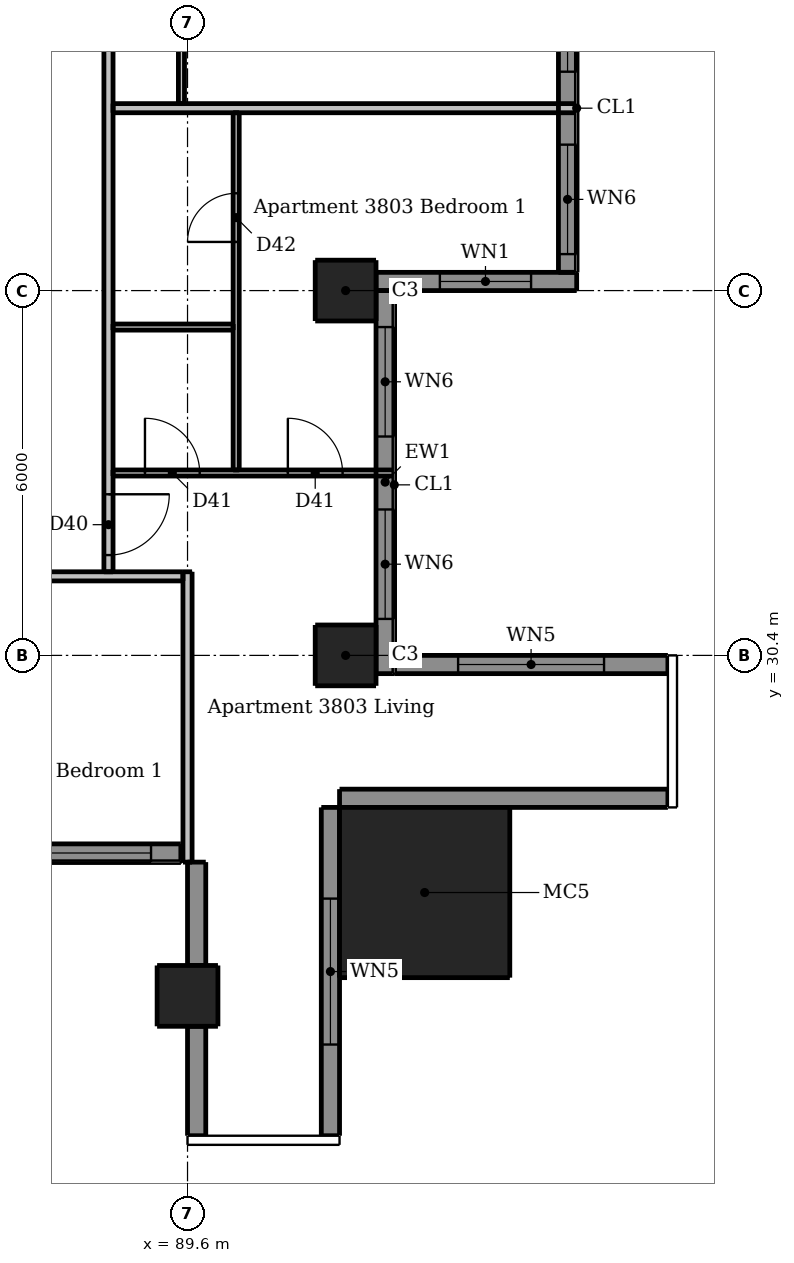
"""IFC4 building model, lengths in metres.
Left out: names, types, materials, properties, quantities, classifications, styles, units other than length and angle.
Written with IfcOpenShell. Run it as: python <this file> out.ifc"""

import sys

from ifc_helpers import new_model, si_unit, direction, frame, frame_2d, origin, origin_2d, place, context, subcontext, project, spatial, rectangle, extrude, element, fill, save


model = new_model("IFC4")
c1 = context("Model", 3, precision=1e-05, world=origin(), true_north=direction((0.0, 1.0)))
c2 = subcontext(c1, "Body", "Model", "MODEL_VIEW")
j1 = project(units=[si_unit("LENGTHUNIT", "METRE"), si_unit("PLANEANGLEUNIT", "RADIAN")], contexts=[c1])
p1 = place(None, origin())
s1 = spatial("IfcSite", under=j1, at=p1, CompositionType="ELEMENT")
p2 = place(p1, origin())
s2 = spatial("IfcBuilding", under=s1, at=p2, CompositionType="ELEMENT")
p3 = place(p2, frame((0.0, 0.0, 143.8)))
s3 = spatial("IfcBuildingStorey", under=s2, at=p3, CompositionType="ELEMENT", Elevation=143.8)
for number, where, z_axis, x_axis in (
    (1, (89.6, 24.8, 0.0), (0.0, 0.0, 1.0), (1.0, 0.0, 0.0)),
    (2, (92.2, 30.4, 0.0), (0.0, 0.0, 1.0), (1.0, 0.0, 0.0)),
    (3, (92.2, 36.4, 0.0), (0.0, 0.0, 1.0), (1.0, 0.0, 0.0)),
):
    element("IfcColumn", number, at=place(p3, frame(where, z_axis=z_axis, x_axis=x_axis)), inside=s3, PredefinedType="COLUMN", context=c2, shape_type="SweptSolid", body=[
        extrude(rectangle(XDim=1.0, YDim=1.0, at=origin_2d()), origin(), (0.0, 0.0, 1.0), 3.05),
    ])
p4 = place(p3, frame((93.5, 26.5, 0.0), z_axis=(0.0, 0.0, 1.0), x_axis=(1.0, 0.0, 0.0)))
e4 = element("IfcColumn", 4, at=p4, inside=s3, PredefinedType="COLUMN", context=c2, shape_type="SweptSolid", body=[
    extrude(rectangle(XDim=2.8, YDim=2.8, at=origin_2d()), origin(), (0.0, 0.0, 1.0), 3.3),
])
p5 = place(p3, frame((89.75, 27.0, 0.0), z_axis=(0.0, 0.0, 1.0), x_axis=(0.0, -1.0, 0.0)))
e5 = element("IfcWall", 5, at=p5, inside=s3, PredefinedType="SOLIDWALL", context=c2, shape_type="SweptSolid", body=[
    extrude(rectangle(XDim=1.7, YDim=0.3, at=frame_2d((0.85, 0.0))), origin(), (0.0, 0.0, 1.0), 3.05),
])
p6 = place(p3, frame((89.75, 24.3, 0.0), z_axis=(0.0, 0.0, 1.0), x_axis=(0.0, -1.0, 0.0)))
e6 = element("IfcWall", 6, at=p6, inside=s3, PredefinedType="SOLIDWALL", context=c2, shape_type="SweptSolid", body=[
    extrude(rectangle(XDim=1.8, YDim=0.3, at=frame_2d((0.9, 0.0))), origin(), (0.0, 0.0, 1.0), 3.05),
])
p7 = place(p3, frame((91.95, 22.5, 0.0), z_axis=(0.0, 0.0, 1.0), x_axis=(0.0, 1.0, 0.0)))
e7 = element("IfcWall", 7, at=p7, inside=s3, PredefinedType="SOLIDWALL", context=c2, shape_type="SweptSolid", body=[
    extrude(rectangle(XDim=5.4, YDim=0.3, at=frame_2d((2.7, 0.0))), origin(), (0.0, 0.0, 1.0), 3.05),
])
p8 = place(p7, frame((1.5, 0.0, 0.15)))
e8 = element("IfcOpeningElement", 8, at=p8, cuts=e7, PredefinedType="OPENING", context=c2, shape_type="SweptSolid", body=[
    extrude(rectangle(XDim=2.4, YDim=2.1, at=frame_2d((1.2, 1.05))), frame((0.0, 0.16, 0.0), z_axis=(0.0, -1.0, 0.0), x_axis=(1.0, 0.0, 0.0)), (0.0, 0.0, 1.0), 0.32),
])
p9 = place(p3, frame((92.1, 28.05, 0.0), z_axis=(0.0, 0.0, 1.0), x_axis=(1.0, 0.0, 0.0)))
e9 = element("IfcWall", 9, at=p9, inside=s3, PredefinedType="SOLIDWALL", context=c2, shape_type="SweptSolid", body=[
    extrude(rectangle(XDim=5.4, YDim=0.3, at=frame_2d((2.7, 0.0))), origin(), (0.0, 0.0, 1.0), 3.05),
])
p10 = place(p3, frame((97.5, 30.25, 0.0), z_axis=(0.0, 0.0, 1.0), x_axis=(-1.0, 0.0, 0.0)))
e10 = element("IfcWall", 10, at=p10, inside=s3, PredefinedType="SOLIDWALL", context=c2, shape_type="SweptSolid", body=[
    extrude(rectangle(XDim=4.5, YDim=0.3, at=frame_2d((2.25, 0.0))), origin(), (0.0, 0.0, 1.0), 3.05),
])
p11 = place(p10, frame((1.05, 0.0, 0.15)))
e11 = element("IfcOpeningElement", 11, at=p11, cuts=e10, PredefinedType="OPENING", context=c2, shape_type="SweptSolid", body=[
    extrude(rectangle(XDim=2.4, YDim=2.1, at=frame_2d((1.2, 1.05))), frame((0.0, 0.16, 0.0), z_axis=(0.0, -1.0, 0.0), x_axis=(1.0, 0.0, 0.0)), (0.0, 0.0, 1.0), 0.32),
])
p12 = place(p3, frame((92.7, 36.55, 0.0), z_axis=(0.0, 0.0, 1.0), x_axis=(1.0, 0.0, 0.0)))
e12 = element("IfcWall", 12, at=p12, inside=s3, PredefinedType="SOLIDWALL", context=c2, shape_type="SweptSolid", body=[
    extrude(rectangle(XDim=3.3, YDim=0.3, at=frame_2d((1.65, 0.0))), origin(), (0.0, 0.0, 1.0), 3.05),
])
p13 = place(p12, frame((1.05, 0.0, 0.9)))
e13 = element("IfcOpeningElement", 13, at=p13, cuts=e12, PredefinedType="OPENING", context=c2, shape_type="SweptSolid", body=[
    extrude(rectangle(XDim=1.5, YDim=1.5, at=frame_2d((0.75, 0.75))), frame((0.0, 0.16, 0.0), z_axis=(0.0, -1.0, 0.0), x_axis=(1.0, 0.0, 0.0)), (0.0, 0.0, 1.0), 0.32),
])
p14 = place(p3, frame((83.7, 27.15, 0.0), z_axis=(0.0, 0.0, 1.0), x_axis=(1.0, 0.0, 0.0)))
e14 = element("IfcWall", 14, at=p14, inside=s3, PredefinedType="SOLIDWALL", context=c2, shape_type="SweptSolid", body=[
    extrude(rectangle(XDim=5.79, YDim=0.3, at=frame_2d((2.895, 0.0))), origin(), (0.0, 0.0, 1.0), 3.05),
])
p15 = place(p14, frame((0.5, 0.0, 0.15)))
e15 = element("IfcOpeningElement", 15, at=p15, cuts=e14, PredefinedType="OPENING", context=c2, shape_type="SweptSolid", body=[
    extrude(rectangle(XDim=1.8, YDim=2.1, at=frame_2d((0.9, 1.05))), frame((0.0, 0.16, 0.0), z_axis=(0.0, -1.0, 0.0), x_axis=(1.0, 0.0, 0.0)), (0.0, 0.0, 1.0), 0.32),
])
p16 = place(p14, frame((3.5, 0.0, 0.15)))
e16 = element("IfcOpeningElement", 16, at=p16, cuts=e14, PredefinedType="OPENING", context=c2, shape_type="SweptSolid", body=[
    extrude(rectangle(XDim=1.8, YDim=2.1, at=frame_2d((0.9, 1.05))), frame((0.0, 0.16, 0.0), z_axis=(0.0, -1.0, 0.0), x_axis=(1.0, 0.0, 0.0)), (0.0, 0.0, 1.0), 0.32),
])
p17 = place(p3, frame((92.85, 30.1, 0.0), z_axis=(0.0, 0.0, 1.0), x_axis=(0.0, 1.0, 0.0)))
e17 = element("IfcWall", 17, at=p17, inside=s3, PredefinedType="SOLIDWALL", context=c2, shape_type="SweptSolid", body=[
    extrude(rectangle(XDim=6.3, YDim=0.3, at=frame_2d((3.15, 0.0))), origin(), (0.0, 0.0, 1.0), 3.05),
])
p18 = place(p17, frame((0.9, 0.0, 0.15)))
e18 = element("IfcOpeningElement", 18, at=p18, cuts=e17, PredefinedType="OPENING", context=c2, shape_type="SweptSolid", body=[
    extrude(rectangle(XDim=1.8, YDim=2.1, at=frame_2d((0.9, 1.05))), frame((0.0, 0.16, 0.0), z_axis=(0.0, -1.0, 0.0), x_axis=(1.0, 0.0, 0.0)), (0.0, 0.0, 1.0), 0.32),
])
p19 = place(p17, frame((3.9, 0.0, 0.15)))
e19 = element("IfcOpeningElement", 19, at=p19, cuts=e17, PredefinedType="OPENING", context=c2, shape_type="SweptSolid", body=[
    extrude(rectangle(XDim=1.8, YDim=2.1, at=frame_2d((0.9, 1.05))), frame((0.0, 0.16, 0.0), z_axis=(0.0, -1.0, 0.0), x_axis=(1.0, 0.0, 0.0)), (0.0, 0.0, 1.0), 0.32),
])
p20 = place(p3, frame((95.85, 36.7, 0.0), z_axis=(0.0, 0.0, 1.0), x_axis=(0.0, 1.0, 0.0)))
e20 = element("IfcWall", 20, at=p20, inside=s3, PredefinedType="SOLIDWALL", context=c2, shape_type="SweptSolid", body=[
    extrude(rectangle(XDim=5.4, YDim=0.3, at=frame_2d((2.7, 0.0))), origin(), (0.0, 0.0, 1.0), 3.05),
])
p21 = place(p20, frame((0.3, 0.0, 0.15)))
e21 = element("IfcOpeningElement", 21, at=p21, cuts=e20, PredefinedType="OPENING", context=c2, shape_type="SweptSolid", body=[
    extrude(rectangle(XDim=1.8, YDim=2.1, at=frame_2d((0.9, 1.05))), frame((0.0, 0.16, 0.0), z_axis=(0.0, -1.0, 0.0), x_axis=(1.0, 0.0, 0.0)), (0.0, 0.0, 1.0), 0.32),
])
p22 = place(p20, frame((3.3, 0.0, 0.15)))
e22 = element("IfcOpeningElement", 22, at=p22, cuts=e20, PredefinedType="OPENING", context=c2, shape_type="SweptSolid", body=[
    extrude(rectangle(XDim=1.8, YDim=2.1, at=frame_2d((0.9, 1.05))), frame((0.0, 0.16, 0.0), z_axis=(0.0, -1.0, 0.0), x_axis=(1.0, 0.0, 0.0)), (0.0, 0.0, 1.0), 0.32),
])
p23 = place(p3, frame((89.5, 54.325, 0.0), z_axis=(0.0, 0.0, 1.0), x_axis=(0.0, -1.0, 0.0)))
e23 = element("IfcWall", 23, at=p23, inside=s3, PredefinedType="PARTITIONING", context=c2, shape_type="SweptSolid", body=[
    extrude(rectangle(XDim=14.85, YDim=0.1, at=frame_2d((7.425, 0.0))), origin(), (0.0, 0.0, 1.0), 3.05),
])
p24 = place(p23, frame((5.475, 0.0, 0.0)))
e24 = element("IfcOpeningElement", 24, at=p24, cuts=e23, PredefinedType="OPENING", context=c2, shape_type="SweptSolid", body=[
    extrude(rectangle(XDim=0.9, YDim=2.1, at=frame_2d((0.45, 1.05))), frame((0.0, 0.06, 0.0), z_axis=(0.0, -1.0, 0.0), x_axis=(1.0, 0.0, 0.0)), (0.0, 0.0, 1.0), 0.12),
])
p25 = place(p23, frame((0.975, 0.0, 0.0)))
e25 = element("IfcOpeningElement", 25, at=p25, cuts=e23, PredefinedType="OPENING", context=c2, shape_type="SweptSolid", body=[
    extrude(rectangle(XDim=0.9, YDim=2.1, at=frame_2d((0.45, 1.05))), frame((0.0, 0.06, 0.0), z_axis=(0.0, -1.0, 0.0), x_axis=(1.0, 0.0, 0.0)), (0.0, 0.0, 1.0), 0.12),
])
p26 = place(p23, frame((12.675, 0.0, 0.0)))
e26 = element("IfcOpeningElement", 26, at=p26, cuts=e23, PredefinedType="OPENING", context=c2, shape_type="SweptSolid", body=[
    extrude(rectangle(XDim=0.9, YDim=2.1, at=frame_2d((0.45, 1.05))), frame((0.0, 0.06, 0.0), z_axis=(0.0, -1.0, 0.0), x_axis=(1.0, 0.0, 0.0)), (0.0, 0.0, 1.0), 0.12),
])
p27 = place(p23, frame((9.725, 0.0, 0.0)))
e27 = element("IfcOpeningElement", 27, at=p27, cuts=e23, PredefinedType="OPENING", context=c2, shape_type="SweptSolid", body=[
    extrude(rectangle(XDim=0.8, YDim=2.1, at=frame_2d((0.4, 1.05))), frame((0.0, 0.06, 0.0), z_axis=(0.0, -1.0, 0.0), x_axis=(1.0, 0.0, 0.0)), (0.0, 0.0, 1.0), 0.12),
])
p28 = place(p3, frame((90.4, 33.45, 0.0), z_axis=(0.0, 0.0, 1.0), x_axis=(0.0, 1.0, 0.0)))
e28 = element("IfcWall", 28, at=p28, inside=s3, PredefinedType="PARTITIONING", context=c2, shape_type="SweptSolid", body=[
    extrude(rectangle(XDim=5.875, YDim=0.1, at=frame_2d((2.938, 0.0))), origin(), (0.0, 0.0, 1.0), 3.05),
])
p29 = place(p28, frame((3.75, 0.0, 0.0)))
e29 = element("IfcOpeningElement", 29, at=p29, cuts=e28, PredefinedType="OPENING", context=c2, shape_type="SweptSolid", body=[
    extrude(rectangle(XDim=0.8, YDim=2.1, at=frame_2d((0.4, 1.05))), frame((0.0, 0.06, 0.0), z_axis=(0.0, -1.0, 0.0), x_axis=(1.0, 0.0, 0.0)), (0.0, 0.0, 1.0), 0.12),
])
p30 = place(p3, frame((88.375, 35.8, 0.0), z_axis=(0.0, 0.0, 1.0), x_axis=(1.0, 0.0, 0.0)))
e30 = element("IfcWall", 30, at=p30, inside=s3, PredefinedType="PARTITIONING", context=c2, shape_type="SweptSolid", body=[
    extrude(rectangle(XDim=1.975, YDim=0.1, at=frame_2d((0.988, 0.0))), origin(), (0.0, 0.0, 1.0), 3.05),
])
p31 = place(p3, frame((88.375, 33.4, 0.0), z_axis=(0.0, 0.0, 1.0), x_axis=(1.0, 0.0, 0.0)))
e31 = element("IfcWall", 31, at=p31, inside=s3, PredefinedType="PARTITIONING", context=c2, shape_type="SweptSolid", body=[
    extrude(rectangle(XDim=4.625, YDim=0.1, at=frame_2d((2.312, 0.0))), origin(), (0.0, 0.0, 1.0), 3.05),
])
p32 = place(p31, frame((0.525, 0.0, 0.0)))
e32 = element("IfcOpeningElement", 32, at=p32, cuts=e31, PredefinedType="OPENING", context=c2, shape_type="SweptSolid", body=[
    extrude(rectangle(XDim=0.9, YDim=2.1, at=frame_2d((0.45, 1.05))), frame((0.0, 0.06, 0.0), z_axis=(0.0, -1.0, 0.0), x_axis=(1.0, 0.0, 0.0)), (0.0, 0.0, 1.0), 0.12),
])
p33 = place(p31, frame((2.875, 0.0, 0.0)))
e33 = element("IfcOpeningElement", 33, at=p33, cuts=e31, PredefinedType="OPENING", context=c2, shape_type="SweptSolid", body=[
    extrude(rectangle(XDim=0.9, YDim=2.1, at=frame_2d((0.45, 1.05))), frame((0.0, 0.06, 0.0), z_axis=(0.0, -1.0, 0.0), x_axis=(1.0, 0.0, 0.0)), (0.0, 0.0, 1.0), 0.12),
])
p34 = place(p3, frame((88.3, 60.475, 0.0), z_axis=(0.0, 0.0, 1.0), x_axis=(0.0, -1.0, 0.0)))
e34 = element("IfcWall", 34, at=p34, inside=s3, PredefinedType="PARTITIONING", context=c2, shape_type="SweptSolid", body=[
    extrude(rectangle(XDim=28.7, YDim=0.15, at=frame_2d((14.35, 0.0))), origin(), (0.0, 0.0, 1.0), 3.05),
])
p35 = place(p34, frame((27.425, 0.0, 0.0)))
e35 = element("IfcOpeningElement", 35, at=p35, cuts=e34, PredefinedType="OPENING", context=c2, shape_type="SweptSolid", body=[
    extrude(rectangle(XDim=1.0, YDim=2.1, at=frame_2d((0.5, 1.05))), frame((0.0, 0.085, 0.0), z_axis=(0.0, -1.0, 0.0), x_axis=(1.0, 0.0, 0.0)), (0.0, 0.0, 1.0), 0.17),
])
p36 = place(p34, frame((13.075, 0.0, 0.0)))
e36 = element("IfcOpeningElement", 36, at=p36, cuts=e34, PredefinedType="OPENING", context=c2, shape_type="SweptSolid", body=[
    extrude(rectangle(XDim=1.0, YDim=2.1, at=frame_2d((0.5, 1.05))), frame((0.0, 0.085, 0.0), z_axis=(0.0, -1.0, 0.0), x_axis=(1.0, 0.0, 0.0)), (0.0, 0.0, 1.0), 0.17),
])
p37 = place(p34, frame((2.575, 0.0, 0.0)))
e37 = element("IfcOpeningElement", 37, at=p37, cuts=e34, PredefinedType="OPENING", context=c2, shape_type="SweptSolid", body=[
    extrude(rectangle(XDim=1.0, YDim=2.1, at=frame_2d((0.5, 1.05))), frame((0.0, 0.085, 0.0), z_axis=(0.0, -1.0, 0.0), x_axis=(1.0, 0.0, 0.0)), (0.0, 0.0, 1.0), 0.17),
])
p38 = place(p3, frame((89.6, 27.0, 0.0), z_axis=(0.0, 0.0, 1.0), x_axis=(0.0, 1.0, 0.0)))
e38 = element("IfcWall", 38, at=p38, inside=s3, PredefinedType="PARTITIONING", context=c2, shape_type="SweptSolid", body=[
    extrude(rectangle(XDim=4.775, YDim=0.15, at=frame_2d((2.387, 0.0))), origin(), (0.0, 0.0, 1.0), 2.51),
])
p39 = place(p3, frame((88.375, 39.4, 0.0), z_axis=(0.0, 0.0, 1.0), x_axis=(1.0, 0.0, 0.0)))
e39 = element("IfcWall", 39, at=p39, inside=s3, PredefinedType="PARTITIONING", context=c2, shape_type="SweptSolid", body=[
    extrude(rectangle(XDim=7.625, YDim=0.15, at=frame_2d((3.812, 0.0))), origin(), (0.0, 0.0, 1.0), 3.05),
])
p40 = place(p3, frame((89.525, 31.7, 0.0), z_axis=(0.0, 0.0, 1.0), x_axis=(-1.0, 0.0, 0.0)))
e40 = element("IfcWall", 40, at=p40, inside=s3, PredefinedType="PARTITIONING", context=c2, shape_type="SweptSolid", body=[
    extrude(rectangle(XDim=28.75, YDim=0.15, at=frame_2d((14.375, 0.0))), origin(), (0.0, 0.0, 1.0), 3.05),
])
p41 = place(p40, frame((25.875, 0.0, 0.0)))
e41 = element("IfcOpeningElement", 41, at=p41, cuts=e40, PredefinedType="OPENING", context=c2, shape_type="SweptSolid", body=[
    extrude(rectangle(XDim=1.0, YDim=2.1, at=frame_2d((0.5, 1.05))), frame((0.0, 0.085, 0.0), z_axis=(0.0, -1.0, 0.0), x_axis=(1.0, 0.0, 0.0)), (0.0, 0.0, 1.0), 0.17),
])
p42 = place(p40, frame((9.925, 0.0, 0.0)))
e42 = element("IfcOpeningElement", 42, at=p42, cuts=e40, PredefinedType="OPENING", context=c2, shape_type="SweptSolid", body=[
    extrude(rectangle(XDim=1.0, YDim=2.1, at=frame_2d((0.5, 1.05))), frame((0.0, 0.085, 0.0), z_axis=(0.0, -1.0, 0.0), x_axis=(1.0, 0.0, 0.0)), (0.0, 0.0, 1.0), 0.17),
])
p43 = place(p8, origin())
e43 = element("IfcWindow", 43, at=p43, inside=s3, PartitioningType="DOUBLE_PANEL_VERTICAL", PredefinedType="WINDOW", context=c2, shape_type="SweptSolid", body=[
    extrude(rectangle(XDim=2.4, YDim=2.1, at=frame_2d((1.2, 1.05))), frame((0.0, 0.03, 0.0), z_axis=(0.0, -1.0, 0.0), x_axis=(1.0, 0.0, 0.0)), (0.0, 0.0, 1.0), 0.06),
])
fill(e8, e43)
p44 = place(p11, origin())
e44 = element("IfcWindow", 44, at=p44, inside=s3, PartitioningType="DOUBLE_PANEL_VERTICAL", PredefinedType="WINDOW", context=c2, shape_type="SweptSolid", body=[
    extrude(rectangle(XDim=2.4, YDim=2.1, at=frame_2d((1.2, 1.05))), frame((0.0, 0.03, 0.0), z_axis=(0.0, -1.0, 0.0), x_axis=(1.0, 0.0, 0.0)), (0.0, 0.0, 1.0), 0.06),
])
fill(e11, e44)
p45 = place(p13, origin())
e45 = element("IfcWindow", 45, at=p45, inside=s3, PartitioningType="DOUBLE_PANEL_VERTICAL", PredefinedType="WINDOW", context=c2, shape_type="SweptSolid", body=[
    extrude(rectangle(XDim=1.5, YDim=1.5, at=frame_2d((0.75, 0.75))), frame((0.0, 0.03, 0.0), z_axis=(0.0, -1.0, 0.0), x_axis=(1.0, 0.0, 0.0)), (0.0, 0.0, 1.0), 0.06),
])
fill(e13, e45)
p46 = place(p16, origin())
e46 = element("IfcWindow", 46, at=p46, inside=s3, PartitioningType="DOUBLE_PANEL_VERTICAL", PredefinedType="WINDOW", context=c2, shape_type="SweptSolid", body=[
    extrude(rectangle(XDim=1.8, YDim=2.1, at=frame_2d((0.9, 1.05))), frame((0.0, 0.03, 0.0), z_axis=(0.0, -1.0, 0.0), x_axis=(1.0, 0.0, 0.0)), (0.0, 0.0, 1.0), 0.06),
])
fill(e16, e46)
p47 = place(p18, origin())
e47 = element("IfcWindow", 47, at=p47, inside=s3, PartitioningType="DOUBLE_PANEL_VERTICAL", PredefinedType="WINDOW", context=c2, shape_type="SweptSolid", body=[
    extrude(rectangle(XDim=1.8, YDim=2.1, at=frame_2d((0.9, 1.05))), frame((0.0, 0.03, 0.0), z_axis=(0.0, -1.0, 0.0), x_axis=(1.0, 0.0, 0.0)), (0.0, 0.0, 1.0), 0.06),
])
fill(e18, e47)
p48 = place(p19, origin())
e48 = element("IfcWindow", 48, at=p48, inside=s3, PartitioningType="DOUBLE_PANEL_VERTICAL", PredefinedType="WINDOW", context=c2, shape_type="SweptSolid", body=[
    extrude(rectangle(XDim=1.8, YDim=2.1, at=frame_2d((0.9, 1.05))), frame((0.0, 0.03, 0.0), z_axis=(0.0, -1.0, 0.0), x_axis=(1.0, 0.0, 0.0)), (0.0, 0.0, 1.0), 0.06),
])
fill(e19, e48)
p49 = place(p21, origin())
e49 = element("IfcWindow", 49, at=p49, inside=s3, PartitioningType="DOUBLE_PANEL_VERTICAL", PredefinedType="WINDOW", context=c2, shape_type="SweptSolid", body=[
    extrude(rectangle(XDim=1.8, YDim=2.1, at=frame_2d((0.9, 1.05))), frame((0.0, 0.03, 0.0), z_axis=(0.0, -1.0, 0.0), x_axis=(1.0, 0.0, 0.0)), (0.0, 0.0, 1.0), 0.06),
])
fill(e21, e49)
p50 = place(p22, origin())
e50 = element("IfcWindow", 50, at=p50, inside=s3, PartitioningType="DOUBLE_PANEL_VERTICAL", PredefinedType="WINDOW", context=c2, shape_type="SweptSolid", body=[
    extrude(rectangle(XDim=1.8, YDim=2.1, at=frame_2d((0.9, 1.05))), frame((0.0, 0.03, 0.0), z_axis=(0.0, -1.0, 0.0), x_axis=(1.0, 0.0, 0.0)), (0.0, 0.0, 1.0), 0.06),
])
fill(e22, e50)
p51 = place(p35, origin())
e51 = element("IfcDoor", 51, at=p51, inside=s3, OperationType="SINGLE_SWING_LEFT", PredefinedType="DOOR", context=c2, shape_type="SweptSolid", body=[
    extrude(rectangle(XDim=1.0, YDim=2.1, at=frame_2d((0.5, 1.05))), frame((0.0, 0.025, 0.0), z_axis=(0.0, -1.0, 0.0), x_axis=(1.0, 0.0, 0.0)), (0.0, 0.0, 1.0), 0.05),
])
fill(e35, e51)
p52 = place(p32, origin())
e52 = element("IfcDoor", 52, at=p52, inside=s3, OperationType="SINGLE_SWING_LEFT", PredefinedType="DOOR", context=c2, shape_type="SweptSolid", body=[
    extrude(rectangle(XDim=0.9, YDim=2.1, at=frame_2d((0.45, 1.05))), frame((0.0, 0.025, 0.0), z_axis=(0.0, -1.0, 0.0), x_axis=(1.0, 0.0, 0.0)), (0.0, 0.0, 1.0), 0.05),
])
fill(e32, e52)
p53 = place(p33, origin())
e53 = element("IfcDoor", 53, at=p53, inside=s3, OperationType="SINGLE_SWING_LEFT", PredefinedType="DOOR", context=c2, shape_type="SweptSolid", body=[
    extrude(rectangle(XDim=0.9, YDim=2.1, at=frame_2d((0.45, 1.05))), frame((0.0, 0.025, 0.0), z_axis=(0.0, -1.0, 0.0), x_axis=(1.0, 0.0, 0.0)), (0.0, 0.0, 1.0), 0.05),
])
fill(e33, e53)
p54 = place(p29, origin())
e54 = element("IfcDoor", 54, at=p54, inside=s3, OperationType="SINGLE_SWING_LEFT", PredefinedType="DOOR", context=c2, shape_type="SweptSolid", body=[
    extrude(rectangle(XDim=0.8, YDim=2.1, at=frame_2d((0.4, 1.05))), frame((0.0, 0.025, 0.0), z_axis=(0.0, -1.0, 0.0), x_axis=(1.0, 0.0, 0.0)), (0.0, 0.0, 1.0), 0.05),
])
fill(e29, e54)
save(model, sys.argv[1])
